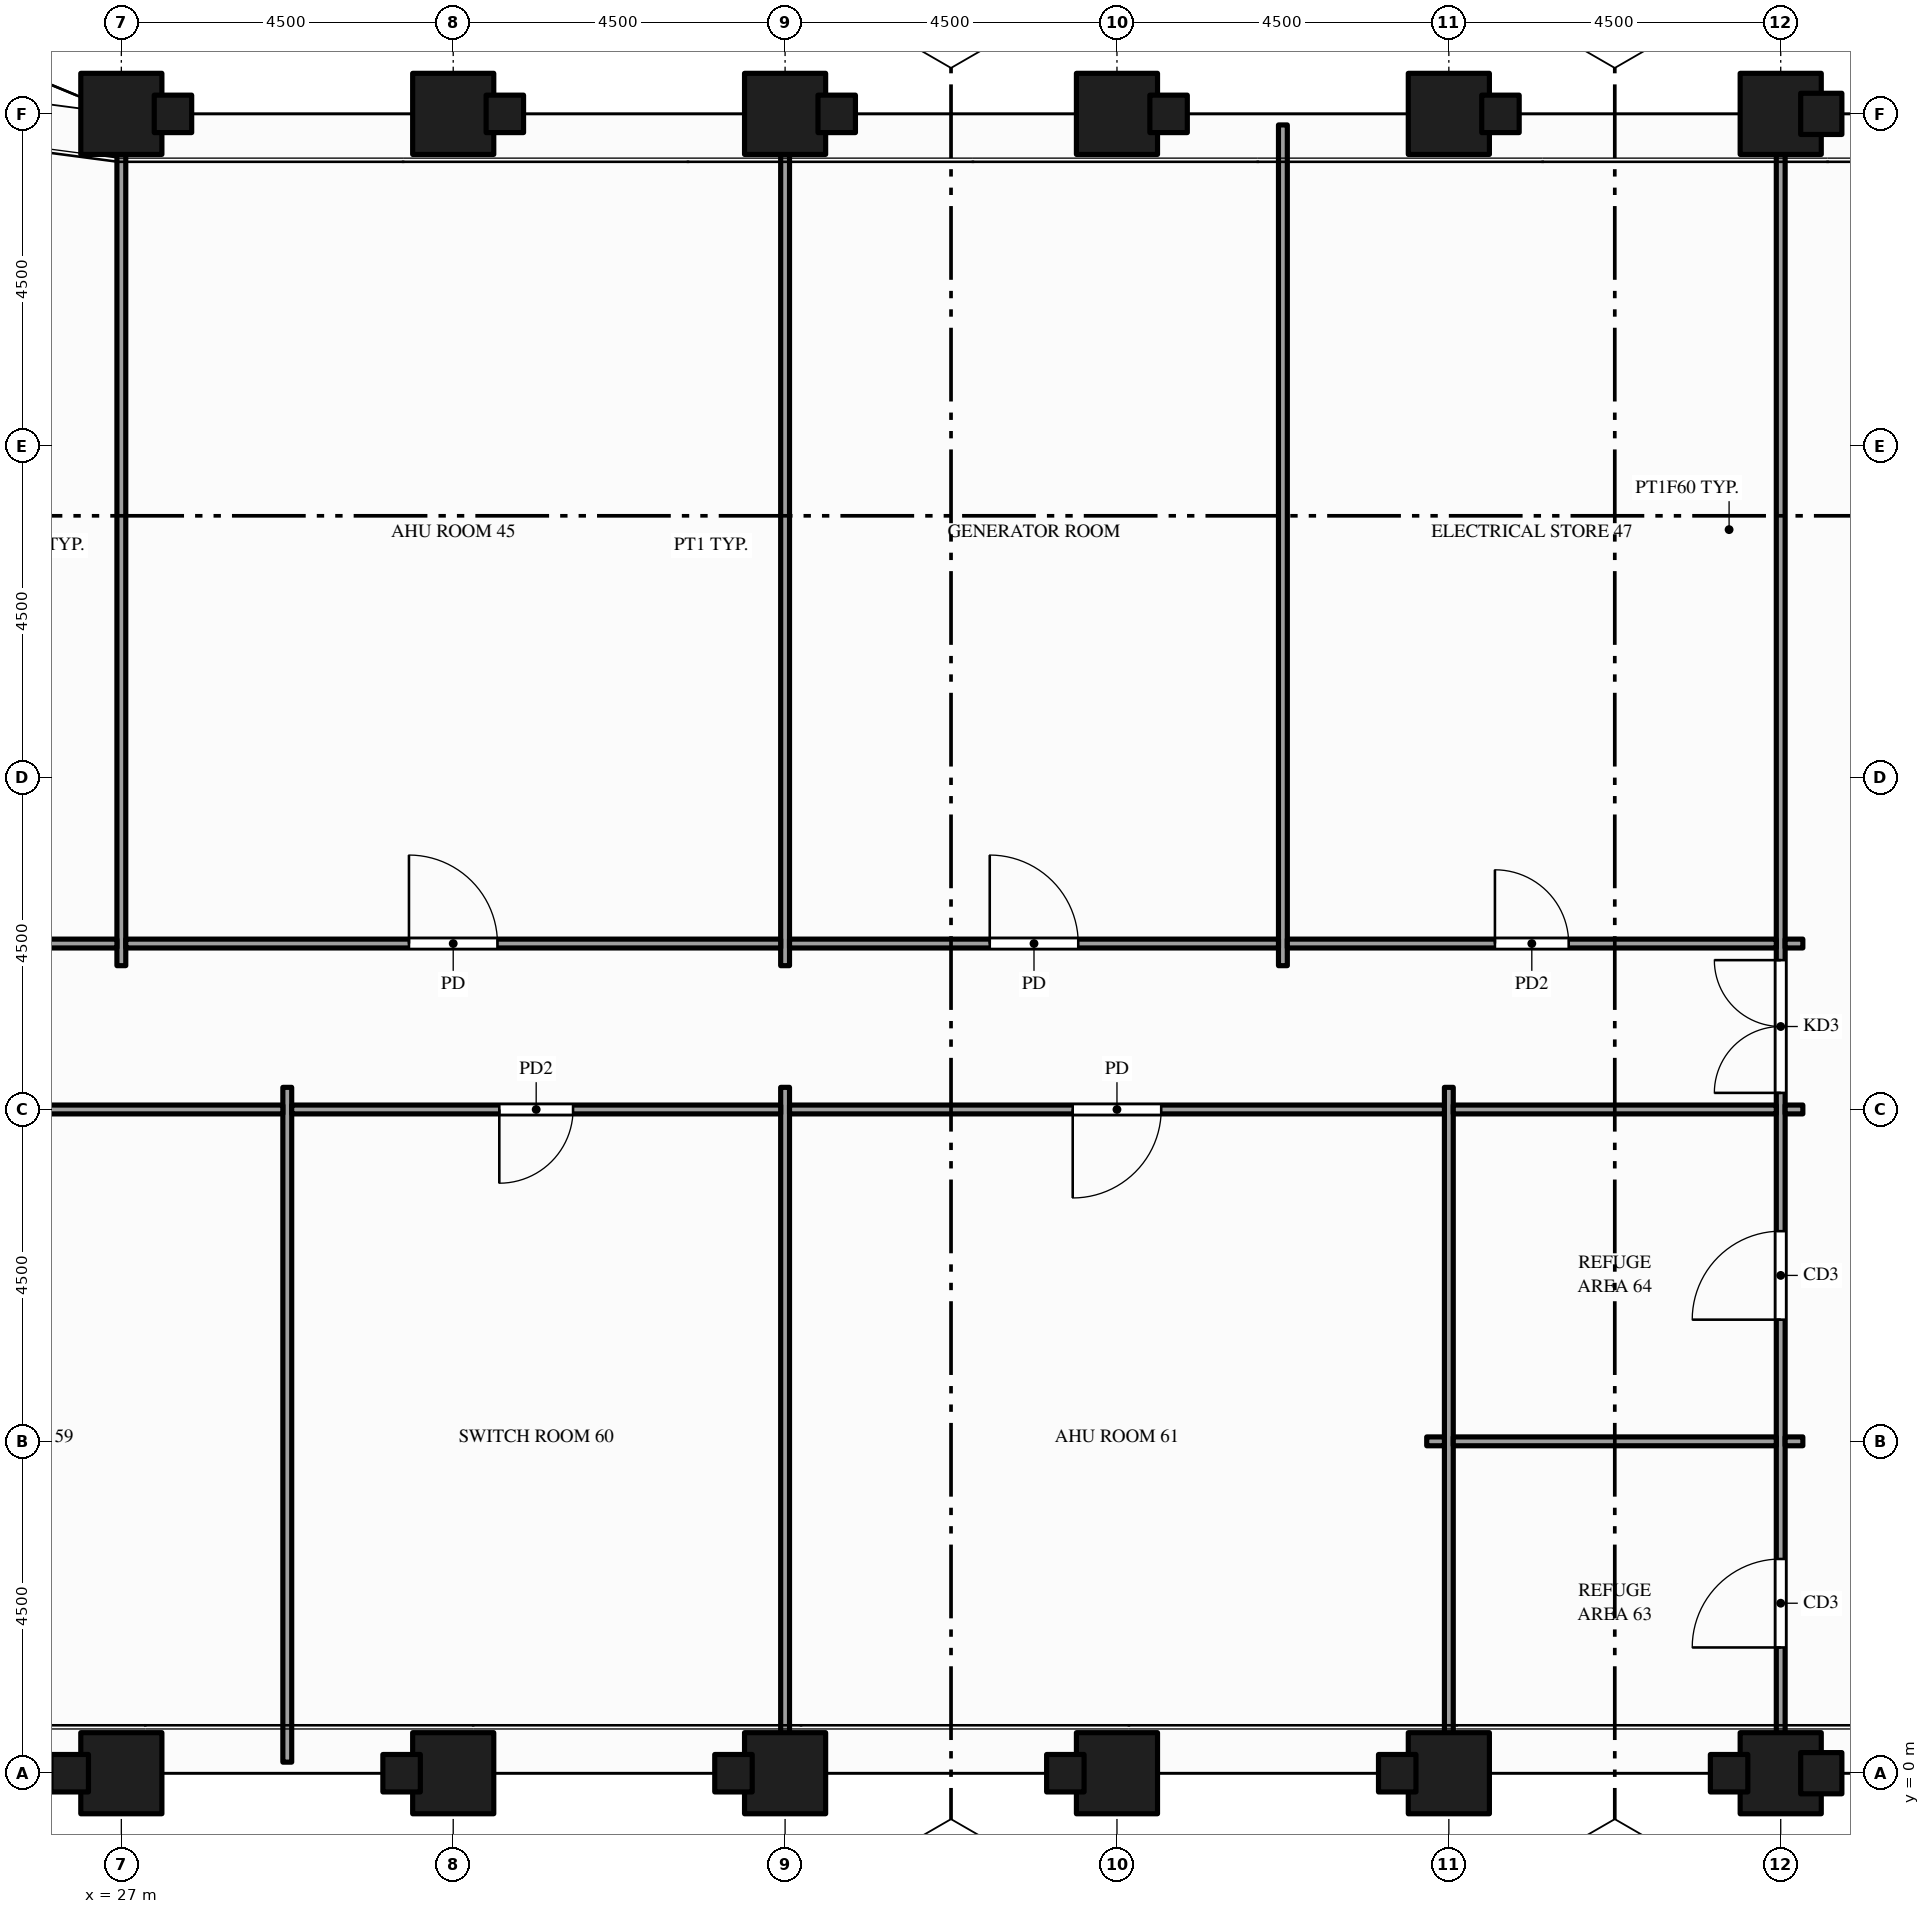
"""IFC4 building model, lengths in metres.
Left out: names, types, materials, properties, quantities, classifications, styles, units other than length and angle.
Written with IfcOpenShell. Run it as: python <this file> out.ifc"""

import sys

from ifc_helpers import new_model, si_unit, direction, frame, frame_2d, origin, origin_2d, place, context, subcontext, project, spatial, rectangle, hollow_rectangle, extrude, element, fill, save


model = new_model("IFC4")
c1 = context("Model", 3, precision=1e-05, world=origin(), true_north=direction((0.0, 1.0)))
c2 = subcontext(c1, "Body", "Model", "MODEL_VIEW")
j1 = project(units=[si_unit("LENGTHUNIT", "METRE"), si_unit("PLANEANGLEUNIT", "RADIAN")], contexts=[c1])
p1 = place(None, origin())
s1 = spatial("IfcSite", under=j1, at=p1, CompositionType="ELEMENT")
p2 = place(p1, origin())
s2 = spatial("IfcBuilding", under=s1, at=p2, CompositionType="ELEMENT")
p3 = place(p2, frame((0.0, 0.0, 77.0)))
s3 = spatial("IfcBuildingStorey", under=s2, at=p3, CompositionType="ELEMENT", Elevation=77.0)
for number, where, z_axis, x_axis in (
    (1, (27.0, 0.0, -0.25), (0.0, 0.0, 1.0), (1.0, 0.0, 0.0)),
    (2, (27.0, 22.5, -0.25), (0.0, 0.0, 1.0), (1.0, 0.0, 0.0)),
    (3, (31.5, 0.0, -0.25), (0.0, 0.0, 1.0), (1.0, 0.0, 0.0)),
    (4, (31.5, 22.5, -0.25), (0.0, 0.0, 1.0), (1.0, 0.0, 0.0)),
    (5, (36.0, 0.0, -0.25), (0.0, 0.0, 1.0), (1.0, 0.0, 0.0)),
    (6, (36.0, 22.5, -0.25), (0.0, 0.0, 1.0), (1.0, 0.0, 0.0)),
    (7, (40.5, 0.0, -0.25), (0.0, 0.0, 1.0), (1.0, 0.0, 0.0)),
    (8, (40.5, 22.5, -0.25), (0.0, 0.0, 1.0), (1.0, 0.0, 0.0)),
    (9, (45.0, 0.0, -0.25), (0.0, 0.0, 1.0), (1.0, 0.0, 0.0)),
    (10, (45.0, 22.5, -0.25), (0.0, 0.0, 1.0), (1.0, 0.0, 0.0)),
    (11, (49.5, 0.0, -0.25), (0.0, 0.0, 1.0), (1.0, 0.0, 0.0)),
    (12, (49.5, 22.5, -0.25), (0.0, 0.0, 1.0), (1.0, 0.0, 0.0)),
):
    element("IfcColumn", number, at=place(p3, frame(where, z_axis=z_axis, x_axis=x_axis)), inside=s3, PredefinedType="COLUMN", context=c2, shape_type="SweptSolid", body=[
        extrude(hollow_rectangle(XDim=1.1, YDim=1.1, WallThickness=0.06, at=origin_2d()), origin(), (0.0, 0.0, 1.0), 6.1),
    ])
p4 = place(p3, frame((27.0, 10.95, 0.0), z_axis=(0.0, 0.0, 1.0), x_axis=(0.0, 1.0, 0.0)))
e13 = element("IfcWall", 13, at=p4, inside=s3, PredefinedType="PARTITIONING", context=c2, shape_type="SweptSolid", body=[
    extrude(rectangle(XDim=11.4, YDim=0.12, at=frame_2d((5.7, 0.0))), origin(), (0.0, 0.0, 1.0), 4.938),
])
for number, where, z_axis, x_axis in (
    (14, (29.25, 0.15, 0.0), (0.0, 0.0, 1.0), (0.0, 1.0, 0.0)),
    (15, (36.0, 0.15, 0.0), (0.0, 0.0, 1.0), (0.0, 1.0, 0.0)),
):
    element("IfcWall", number, at=place(p3, frame(where, z_axis=z_axis, x_axis=x_axis)), inside=s3, PredefinedType="PARTITIONING", context=c2, shape_type="SweptSolid", body=[
        extrude(rectangle(XDim=9.15, YDim=0.12, at=frame_2d((4.575, 0.0))), origin(), (0.0, 0.0, 1.0), 4.938),
    ])
p5 = place(p3, frame((36.0, 10.95, 0.0), z_axis=(0.0, 0.0, 1.0), x_axis=(0.0, 1.0, 0.0)))
e16 = element("IfcWall", 16, at=p5, inside=s3, PredefinedType="PARTITIONING", context=c2, shape_type="SweptSolid", body=[
    extrude(rectangle(XDim=11.4, YDim=0.12, at=frame_2d((5.7, 0.0))), origin(), (0.0, 0.0, 1.0), 4.45),
])
p6 = place(p3, frame((42.75, 10.95, 0.0), z_axis=(0.0, 0.0, 1.0), x_axis=(0.0, 1.0, 0.0)))
e17 = element("IfcWall", 17, at=p6, inside=s3, PredefinedType="PARTITIONING", context=c2, shape_type="SweptSolid", body=[
    extrude(rectangle(XDim=11.4, YDim=0.12, at=frame_2d((5.7, 0.0))), origin(), (0.0, 0.0, 1.0), 4.938),
])
p7 = place(p3, frame((45.0, 0.15, 0.0), z_axis=(0.0, 0.0, 1.0), x_axis=(0.0, 1.0, 0.0)))
e18 = element("IfcWall", 18, at=p7, inside=s3, PredefinedType="PARTITIONING", context=c2, shape_type="SweptSolid", body=[
    extrude(rectangle(XDim=9.15, YDim=0.12, at=frame_2d((4.575, 0.0))), origin(), (0.0, 0.0, 1.0), 4.938),
])
p8 = place(p3, frame((49.5, 0.15, 0.0), z_axis=(0.0, 0.0, 1.0), x_axis=(0.0, 1.0, 0.0)))
e19 = element("IfcWall", 19, at=p8, inside=s3, PredefinedType="PARTITIONING", context=c2, shape_type="SweptSolid", body=[
    extrude(rectangle(XDim=22.2, YDim=0.12, at=frame_2d((11.1, 0.0))), origin(), (0.0, 0.0, 1.0), 4.45),
])
p9 = place(p8, frame((9.075, 0.0, 0.0)))
e20 = element("IfcOpeningElement", 20, at=p9, cuts=e19, PredefinedType="OPENING", context=c2, shape_type="SweptSolid", body=[
    extrude(rectangle(XDim=1.8, YDim=2.1, at=frame_2d((0.9, 1.05))), frame((0.0, 0.07, 0.0), z_axis=(0.0, -1.0, 0.0), x_axis=(1.0, 0.0, 0.0)), (0.0, 0.0, 1.0), 0.14),
])
p10 = place(p8, frame((1.555, 0.0, 0.0)))
e21 = element("IfcOpeningElement", 21, at=p10, cuts=e19, PredefinedType="OPENING", context=c2, shape_type="SweptSolid", body=[
    extrude(rectangle(XDim=1.2, YDim=2.1, at=frame_2d((0.6, 1.05))), frame((0.0, 0.07, 0.0), z_axis=(0.0, -1.0, 0.0), x_axis=(1.0, 0.0, 0.0)), (0.0, 0.0, 1.0), 0.14),
])
p11 = place(p8, frame((6.0, 0.0, 0.0)))
e22 = element("IfcOpeningElement", 22, at=p11, cuts=e19, PredefinedType="OPENING", context=c2, shape_type="SweptSolid", body=[
    extrude(rectangle(XDim=1.2, YDim=2.1, at=frame_2d((0.6, 1.05))), frame((0.0, 0.07, 0.0), z_axis=(0.0, -1.0, 0.0), x_axis=(1.0, 0.0, 0.0)), (0.0, 0.0, 1.0), 0.14),
])
p12 = place(p3, frame((44.7, 4.5, 0.0), z_axis=(0.0, 0.0, 1.0), x_axis=(1.0, 0.0, 0.0)))
e23 = element("IfcWall", 23, at=p12, inside=s3, PredefinedType="PARTITIONING", context=c2, shape_type="SweptSolid", body=[
    extrude(rectangle(XDim=0.24, YDim=0.12, at=frame_2d((0.12, 0.0))), origin(), (0.0, 0.0, 1.0), 4.938),
])
p13 = place(p3, frame((45.06, 4.5, 0.0), z_axis=(0.0, 0.0, 1.0), x_axis=(1.0, 0.0, 0.0)))
e24 = element("IfcWall", 24, at=p13, inside=s3, PredefinedType="PARTITIONING", context=c2, shape_type="SweptSolid", body=[
    extrude(rectangle(XDim=4.38, YDim=0.12, at=frame_2d((2.19, 0.0))), origin(), (0.0, 0.0, 1.0), 4.938),
])
p14 = place(p3, frame((49.56, 4.5, 0.0), z_axis=(0.0, 0.0, 1.0), x_axis=(1.0, 0.0, 0.0)))
e25 = element("IfcWall", 25, at=p14, inside=s3, PredefinedType="PARTITIONING", context=c2, shape_type="SweptSolid", body=[
    extrude(rectangle(XDim=0.24, YDim=0.12, at=frame_2d((0.12, 0.0))), origin(), (0.0, 0.0, 1.0), 4.938),
])
p15 = place(p3, frame((20.31, 9.0, 0.0), z_axis=(0.0, 0.0, 1.0), x_axis=(1.0, 0.0, 0.0)))
e26 = element("IfcWall", 26, at=p15, inside=s3, PredefinedType="PARTITIONING", context=c2, shape_type="SweptSolid", body=[
    extrude(rectangle(XDim=8.88, YDim=0.12, at=frame_2d((4.44, 0.0))), origin(), (0.0, 0.0, 1.0), 4.938),
])
p16 = place(p15, frame((3.94, 0.0, 0.0)))
e27 = element("IfcOpeningElement", 27, at=p16, cuts=e26, PredefinedType="OPENING", context=c2, shape_type="SweptSolid", body=[
    extrude(rectangle(XDim=1.0, YDim=2.1, at=frame_2d((0.5, 1.05))), frame((0.0, 0.07, 0.0), z_axis=(0.0, -1.0, 0.0), x_axis=(1.0, 0.0, 0.0)), (0.0, 0.0, 1.0), 0.14),
])
p17 = place(p3, frame((29.31, 9.0, 0.0), z_axis=(0.0, 0.0, 1.0), x_axis=(1.0, 0.0, 0.0)))
e28 = element("IfcWall", 28, at=p17, inside=s3, PredefinedType="PARTITIONING", context=c2, shape_type="SweptSolid", body=[
    extrude(rectangle(XDim=6.63, YDim=0.12, at=frame_2d((3.315, 0.0))), origin(), (0.0, 0.0, 1.0), 4.938),
])
p18 = place(p17, frame((2.815, 0.0, 0.0)))
e29 = element("IfcOpeningElement", 29, at=p18, cuts=e28, PredefinedType="OPENING", context=c2, shape_type="SweptSolid", body=[
    extrude(rectangle(XDim=1.0, YDim=2.1, at=frame_2d((0.5, 1.05))), frame((0.0, 0.07, 0.0), z_axis=(0.0, -1.0, 0.0), x_axis=(1.0, 0.0, 0.0)), (0.0, 0.0, 1.0), 0.14),
])
p19 = place(p3, frame((36.06, 9.0, 0.0), z_axis=(0.0, 0.0, 1.0), x_axis=(1.0, 0.0, 0.0)))
e30 = element("IfcWall", 30, at=p19, inside=s3, PredefinedType="PARTITIONING", context=c2, shape_type="SweptSolid", body=[
    extrude(rectangle(XDim=8.88, YDim=0.12, at=frame_2d((4.44, 0.0))), origin(), (0.0, 0.0, 1.0), 4.938),
])
p20 = place(p19, frame((3.84, 0.0, 0.0)))
e31 = element("IfcOpeningElement", 31, at=p20, cuts=e30, PredefinedType="OPENING", context=c2, shape_type="SweptSolid", body=[
    extrude(rectangle(XDim=1.2, YDim=2.1, at=frame_2d((0.6, 1.05))), frame((0.0, 0.07, 0.0), z_axis=(0.0, -1.0, 0.0), x_axis=(1.0, 0.0, 0.0)), (0.0, 0.0, 1.0), 0.14),
])
p21 = place(p3, frame((45.06, 9.0, 0.0), z_axis=(0.0, 0.0, 1.0), x_axis=(1.0, 0.0, 0.0)))
e32 = element("IfcWall", 32, at=p21, inside=s3, PredefinedType="PARTITIONING", context=c2, shape_type="SweptSolid", body=[
    extrude(rectangle(XDim=4.38, YDim=0.12, at=frame_2d((2.19, 0.0))), origin(), (0.0, 0.0, 1.0), 4.938),
])
p22 = place(p3, frame((49.56, 9.0, 0.0), z_axis=(0.0, 0.0, 1.0), x_axis=(1.0, 0.0, 0.0)))
e33 = element("IfcWall", 33, at=p22, inside=s3, PredefinedType="PARTITIONING", context=c2, shape_type="SweptSolid", body=[
    extrude(rectangle(XDim=0.24, YDim=0.12, at=frame_2d((0.12, 0.0))), origin(), (0.0, 0.0, 1.0), 4.938),
])
p23 = place(p3, frame((11.31, 11.25, 0.0), z_axis=(0.0, 0.0, 1.0), x_axis=(1.0, 0.0, 0.0)))
e34 = element("IfcWall", 34, at=p23, inside=s3, PredefinedType="PARTITIONING", context=c2, shape_type="SweptSolid", body=[
    extrude(rectangle(XDim=15.63, YDim=0.12, at=frame_2d((7.815, 0.0))), origin(), (0.0, 0.0, 1.0), 4.938),
])
p24 = place(p23, frame((3.54, 0.0, 0.0)))
e35 = element("IfcOpeningElement", 35, at=p24, cuts=e34, PredefinedType="OPENING", context=c2, shape_type="SweptSolid", body=[
    extrude(rectangle(XDim=1.8, YDim=2.1, at=frame_2d((0.9, 1.05))), frame((0.0, 0.07, 0.0), z_axis=(0.0, -1.0, 0.0), x_axis=(1.0, 0.0, 0.0)), (0.0, 0.0, 1.0), 0.14),
])
p25 = place(p3, frame((27.06, 11.25, 0.0), z_axis=(0.0, 0.0, 1.0), x_axis=(1.0, 0.0, 0.0)))
e36 = element("IfcWall", 36, at=p25, inside=s3, PredefinedType="PARTITIONING", context=c2, shape_type="SweptSolid", body=[
    extrude(rectangle(XDim=8.88, YDim=0.12, at=frame_2d((4.44, 0.0))), origin(), (0.0, 0.0, 1.0), 4.938),
])
p26 = place(p25, frame((3.84, 0.0, 0.0)))
e37 = element("IfcOpeningElement", 37, at=p26, cuts=e36, PredefinedType="OPENING", context=c2, shape_type="SweptSolid", body=[
    extrude(rectangle(XDim=1.2, YDim=2.1, at=frame_2d((0.6, 1.05))), frame((0.0, 0.07, 0.0), z_axis=(0.0, -1.0, 0.0), x_axis=(1.0, 0.0, 0.0)), (0.0, 0.0, 1.0), 0.14),
])
p27 = place(p3, frame((36.06, 11.25, 0.0), z_axis=(0.0, 0.0, 1.0), x_axis=(1.0, 0.0, 0.0)))
e38 = element("IfcWall", 38, at=p27, inside=s3, PredefinedType="PARTITIONING", context=c2, shape_type="SweptSolid", body=[
    extrude(rectangle(XDim=6.63, YDim=0.12, at=frame_2d((3.315, 0.0))), origin(), (0.0, 0.0, 1.0), 4.938),
])
p28 = place(p27, frame((2.715, 0.0, 0.0)))
e39 = element("IfcOpeningElement", 39, at=p28, cuts=e38, PredefinedType="OPENING", context=c2, shape_type="SweptSolid", body=[
    extrude(rectangle(XDim=1.2, YDim=2.1, at=frame_2d((0.6, 1.05))), frame((0.0, 0.07, 0.0), z_axis=(0.0, -1.0, 0.0), x_axis=(1.0, 0.0, 0.0)), (0.0, 0.0, 1.0), 0.14),
])
p29 = place(p3, frame((42.81, 11.25, 0.0), z_axis=(0.0, 0.0, 1.0), x_axis=(1.0, 0.0, 0.0)))
e40 = element("IfcWall", 40, at=p29, inside=s3, PredefinedType="PARTITIONING", context=c2, shape_type="SweptSolid", body=[
    extrude(rectangle(XDim=6.63, YDim=0.12, at=frame_2d((3.315, 0.0))), origin(), (0.0, 0.0, 1.0), 4.938),
])
p30 = place(p29, frame((2.815, 0.0, 0.0)))
e41 = element("IfcOpeningElement", 41, at=p30, cuts=e40, PredefinedType="OPENING", context=c2, shape_type="SweptSolid", body=[
    extrude(rectangle(XDim=1.0, YDim=2.1, at=frame_2d((0.5, 1.05))), frame((0.0, 0.07, 0.0), z_axis=(0.0, -1.0, 0.0), x_axis=(1.0, 0.0, 0.0)), (0.0, 0.0, 1.0), 0.14),
])
p31 = place(p3, frame((49.56, 11.25, 0.0), z_axis=(0.0, 0.0, 1.0), x_axis=(1.0, 0.0, 0.0)))
e42 = element("IfcWall", 42, at=p31, inside=s3, PredefinedType="PARTITIONING", context=c2, shape_type="SweptSolid", body=[
    extrude(rectangle(XDim=0.24, YDim=0.12, at=frame_2d((0.12, 0.0))), origin(), (0.0, 0.0, 1.0), 4.938),
])
p32 = place(p9, origin())
e43 = element("IfcDoor", 43, at=p32, inside=s3, OperationType="DOUBLE_DOOR_SINGLE_SWING", PredefinedType="DOOR", context=c2, shape_type="SweptSolid", body=[
    extrude(rectangle(XDim=1.8, YDim=2.1, at=frame_2d((0.9, 1.05))), frame((0.0, 0.025, 0.0), z_axis=(0.0, -1.0, 0.0), x_axis=(1.0, 0.0, 0.0)), (0.0, 0.0, 1.0), 0.05),
])
fill(e20, e43)
p33 = place(p18, origin())
e44 = element("IfcDoor", 44, at=p33, inside=s3, OperationType="SINGLE_SWING_LEFT", PredefinedType="DOOR", context=c2, shape_type="SweptSolid", body=[
    extrude(rectangle(XDim=1.0, YDim=2.1, at=frame_2d((0.5, 1.05))), frame((0.0, 0.025, 0.0), z_axis=(0.0, -1.0, 0.0), x_axis=(1.0, 0.0, 0.0)), (0.0, 0.0, 1.0), 0.05),
])
fill(e29, e44)
p34 = place(p20, origin())
e45 = element("IfcDoor", 45, at=p34, inside=s3, OperationType="SINGLE_SWING_LEFT", PredefinedType="DOOR", context=c2, shape_type="SweptSolid", body=[
    extrude(rectangle(XDim=1.2, YDim=2.1, at=frame_2d((0.6, 1.05))), frame((0.0, 0.025, 0.0), z_axis=(0.0, -1.0, 0.0), x_axis=(1.0, 0.0, 0.0)), (0.0, 0.0, 1.0), 0.05),
])
fill(e31, e45)
p35 = place(p10, origin())
e46 = element("IfcDoor", 46, at=p35, inside=s3, OperationType="SINGLE_SWING_LEFT", PredefinedType="DOOR", context=c2, shape_type="SweptSolid", body=[
    extrude(rectangle(XDim=1.2, YDim=2.1, at=frame_2d((0.6, 1.05))), frame((0.0, 0.025, 0.0), z_axis=(0.0, -1.0, 0.0), x_axis=(1.0, 0.0, 0.0)), (0.0, 0.0, 1.0), 0.05),
])
fill(e21, e46)
p36 = place(p11, origin())
e47 = element("IfcDoor", 47, at=p36, inside=s3, OperationType="SINGLE_SWING_LEFT", PredefinedType="DOOR", context=c2, shape_type="SweptSolid", body=[
    extrude(rectangle(XDim=1.2, YDim=2.1, at=frame_2d((0.6, 1.05))), frame((0.0, 0.025, 0.0), z_axis=(0.0, -1.0, 0.0), x_axis=(1.0, 0.0, 0.0)), (0.0, 0.0, 1.0), 0.05),
])
fill(e22, e47)
p37 = place(p26, origin())
e48 = element("IfcDoor", 48, at=p37, inside=s3, OperationType="SINGLE_SWING_LEFT", PredefinedType="DOOR", context=c2, shape_type="SweptSolid", body=[
    extrude(rectangle(XDim=1.2, YDim=2.1, at=frame_2d((0.6, 1.05))), frame((0.0, 0.025, 0.0), z_axis=(0.0, -1.0, 0.0), x_axis=(1.0, 0.0, 0.0)), (0.0, 0.0, 1.0), 0.05),
])
fill(e37, e48)
p38 = place(p28, origin())
e49 = element("IfcDoor", 49, at=p38, inside=s3, OperationType="SINGLE_SWING_LEFT", PredefinedType="DOOR", context=c2, shape_type="SweptSolid", body=[
    extrude(rectangle(XDim=1.2, YDim=2.1, at=frame_2d((0.6, 1.05))), frame((0.0, 0.025, 0.0), z_axis=(0.0, -1.0, 0.0), x_axis=(1.0, 0.0, 0.0)), (0.0, 0.0, 1.0), 0.05),
])
fill(e39, e49)
p39 = place(p30, origin())
e50 = element("IfcDoor", 50, at=p39, inside=s3, OperationType="SINGLE_SWING_LEFT", PredefinedType="DOOR", context=c2, shape_type="SweptSolid", body=[
    extrude(rectangle(XDim=1.0, YDim=2.1, at=frame_2d((0.5, 1.05))), frame((0.0, 0.025, 0.0), z_axis=(0.0, -1.0, 0.0), x_axis=(1.0, 0.0, 0.0)), (0.0, 0.0, 1.0), 0.05),
])
fill(e41, e50)
save(model, sys.argv[1])
